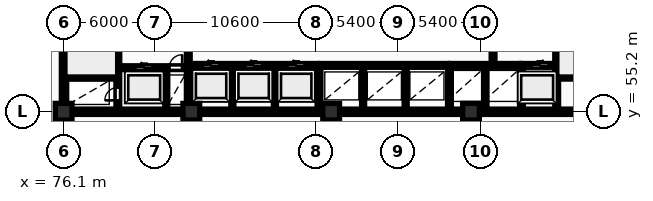
"""IFC4 building model, lengths in metres.
Left out: names, types, materials, properties, quantities, classifications, styles, units other than length and angle.
Written with IfcOpenShell. Run it as: python <this file> out.ifc"""

import sys

from ifc_helpers import new_model, si_unit, direction, frame, frame_2d, origin, origin_2d, place, context, subcontext, project, spatial, rectangle, extrude, element, fill, save


model = new_model("IFC4")
c1 = context("Model", 3, precision=1e-05, world=origin(), true_north=direction((0.0, 1.0)))
c2 = subcontext(c1, "Body", "Model", "MODEL_VIEW")
j1 = project(units=[si_unit("LENGTHUNIT", "METRE"), si_unit("PLANEANGLEUNIT", "RADIAN")], contexts=[c1])
p1 = place(None, origin())
s1 = spatial("IfcSite", under=j1, at=p1, CompositionType="ELEMENT")
p2 = place(p1, origin())
s2 = spatial("IfcBuilding", under=s1, at=p2, CompositionType="ELEMENT")
p3 = place(p2, frame((0.0, 0.0, 5.4)))
s3 = spatial("IfcBuildingStorey", under=s2, at=p3, CompositionType="ELEMENT", Elevation=5.4)
for number, where, z_axis, x_axis in (
    (1, (76.1, 55.2, 0.0), (0.0, 0.0, 1.0), (1.0, 0.0, 0.0)),
    (2, (84.5, 55.2, 0.0), (0.0, 0.0, 1.0), (1.0, 0.0, 0.0)),
    (3, (93.7, 55.2, 0.0), (0.0, 0.0, 1.0), (1.0, 0.0, 0.0)),
    (4, (102.9, 55.2, 0.0), (0.0, 0.0, 1.0), (1.0, 0.0, 0.0)),
):
    element("IfcColumn", number, at=place(p3, frame(where, z_axis=z_axis, x_axis=x_axis)), inside=s3, PredefinedType="COLUMN", context=c2, shape_type="SweptSolid", body=[
        extrude(rectangle(XDim=1.1, YDim=1.1, at=origin_2d()), origin(), (0.0, 0.0, 1.0), 4.6),
    ])
p4 = place(p3, frame((75.95, 55.2, 0.0), z_axis=(0.0, 0.0, 1.0), x_axis=(1.0, 0.0, 0.0)))
e5 = element("IfcWall", 5, at=p4, inside=s3, PredefinedType="SHEAR", context=c2, shape_type="SweptSolid", body=[
    extrude(rectangle(XDim=36.3, YDim=0.35, at=frame_2d((18.15, 0.0))), origin(), (0.0, 0.0, 1.0), 4.6),
])
p5 = place(p3, frame((76.125, 55.375, 0.0), z_axis=(0.0, 0.0, 1.0), x_axis=(0.0, 1.0, 0.0)))
e6 = element("IfcWall", 6, at=p5, inside=s3, PredefinedType="SHEAR", context=c2, shape_type="SweptSolid", body=[
    extrude(rectangle(XDim=11.65, YDim=0.35, at=frame_2d((5.825, 0.0))), origin(), (0.0, 0.0, 1.0), 4.6),
])
p6 = place(p3, frame((79.665, 55.4, 0.0), z_axis=(0.0, 0.0, 1.0), x_axis=(0.0, 1.0, 0.0)))
e7 = element("IfcWall", 7, at=p6, inside=s3, PredefinedType="SHEAR", context=c2, shape_type="SweptSolid", body=[
    extrude(rectangle(XDim=11.6, YDim=0.25, at=frame_2d((5.8, 0.0))), origin(), (0.0, 0.0, 1.0), 4.6),
])
p7 = place(p6, frame((0.55, 0.0, 0.0)))
e8 = element("IfcOpeningElement", 8, at=p7, cuts=e7, PredefinedType="OPENING", context=c2, shape_type="SweptSolid", body=[
    extrude(rectangle(XDim=0.85, YDim=2.05, at=frame_2d((0.425, 1.025))), frame((0.0, 0.135, 0.0), z_axis=(0.0, -1.0, 0.0), x_axis=(1.0, 0.0, 0.0)), (0.0, 0.0, 1.0), 0.27),
])
p8 = place(p6, frame((8.4, 0.0, 0.0)))
e9 = element("IfcOpeningElement", 9, at=p8, cuts=e7, PredefinedType="OPENING", context=c2, shape_type="SweptSolid", body=[
    extrude(rectangle(XDim=1.1, YDim=2.1, at=frame_2d((0.55, 1.05))), frame((0.0, 0.135, 0.0), z_axis=(0.0, -1.0, 0.0), x_axis=(1.0, 0.0, 0.0)), (0.0, 0.0, 1.0), 0.27),
])
p9 = place(p6, frame((10.25, 0.0, 0.0)))
e10 = element("IfcOpeningElement", 10, at=p9, cuts=e7, PredefinedType="OPENING", context=c2, shape_type="SweptSolid", body=[
    extrude(rectangle(XDim=0.85, YDim=2.05, at=frame_2d((0.425, 1.025))), frame((0.0, 0.135, 0.0), z_axis=(0.0, -1.0, 0.0), x_axis=(1.0, 0.0, 0.0)), (0.0, 0.0, 1.0), 0.27),
])
p10 = place(p3, frame((76.3, 57.475, 0.0), z_axis=(0.0, 0.0, 1.0), x_axis=(1.0, 0.0, 0.0)))
e11 = element("IfcWall", 11, at=p10, inside=s3, PredefinedType="SHEAR", context=c2, shape_type="SweptSolid", body=[
    extrude(rectangle(XDim=3.24, YDim=0.25, at=frame_2d((1.62, 0.0))), origin(), (0.0, 0.0, 1.0), 4.6),
])
p11 = place(p3, frame((79.79, 58.1, 0.0), z_axis=(0.0, 0.0, 1.0), x_axis=(1.0, 0.0, 0.0)))
e12 = element("IfcWall", 12, at=p11, inside=s3, PredefinedType="SHEAR", context=c2, shape_type="SweptSolid", body=[
    extrude(rectangle(XDim=4.39, YDim=0.25, at=frame_2d((2.195, 0.0))), origin(), (0.0, 0.0, 1.0), 4.6),
])
p12 = place(p11, frame((1.05, 0.0, 0.0)))
e13 = element("IfcOpeningElement", 13, at=p12, cuts=e12, PredefinedType="OPENING", context=c2, shape_type="SweptSolid", body=[
    extrude(rectangle(XDim=1.12, YDim=2.12, at=frame_2d((0.56, 1.06))), frame((0.0, 0.135, 0.0), z_axis=(0.0, -1.0, 0.0), x_axis=(1.0, 0.0, 0.0)), (0.0, 0.0, 1.0), 0.27),
])
p13 = place(p11, frame((3.26, 0.0, 0.0)))
e14 = element("IfcOpeningElement", 14, at=p13, cuts=e12, PredefinedType="OPENING", context=c2, shape_type="SweptSolid", body=[
    extrude(rectangle(XDim=0.85, YDim=2.05, at=frame_2d((0.425, 1.025))), frame((0.0, 0.135, 0.0), z_axis=(0.0, -1.0, 0.0), x_axis=(1.0, 0.0, 0.0)), (0.0, 0.0, 1.0), 0.27),
])
p14 = place(p3, frame((82.85, 55.4, 0.0), z_axis=(0.0, 0.0, 1.0), x_axis=(0.0, 1.0, 0.0)))
e15 = element("IfcWall", 15, at=p14, inside=s3, PredefinedType="PARTITIONING", context=c2, shape_type="SweptSolid", body=[
    extrude(rectangle(XDim=2.56, YDim=0.2, at=frame_2d((1.28, 0.0))), origin(), (0.0, 0.0, 1.0), 4.3),
])
p15 = place(p3, frame((84.3, 55.4, 0.0), z_axis=(0.0, 0.0, 1.0), x_axis=(0.0, 1.0, 0.0)))
e16 = element("IfcWall", 16, at=p15, inside=s3, PredefinedType="SHEAR", context=c2, shape_type="SweptSolid", body=[
    extrude(rectangle(XDim=11.6, YDim=0.25, at=frame_2d((5.8, 0.0))), origin(), (0.0, 0.0, 1.0), 4.6),
])
p16 = place(p15, frame((5.2, 0.0, 0.0)))
e17 = element("IfcOpeningElement", 17, at=p16, cuts=e16, PredefinedType="OPENING", context=c2, shape_type="SweptSolid", body=[
    extrude(rectangle(XDim=1.1, YDim=2.1, at=frame_2d((0.55, 1.05))), frame((0.0, 0.135, 0.0), z_axis=(0.0, -1.0, 0.0), x_axis=(1.0, 0.0, 0.0)), (0.0, 0.0, 1.0), 0.27),
])
for number, where, z_axis, x_axis in (
    (18, (87.2, 55.4, 0.0), (0.0, 0.0, 1.0), (0.0, 1.0, 0.0)),
    (19, (90.0, 55.4, 0.0), (0.0, 0.0, 1.0), (0.0, 1.0, 0.0)),
):
    element("IfcWall", number, at=place(p3, frame(where, z_axis=z_axis, x_axis=x_axis)), inside=s3, PredefinedType="PARTITIONING", context=c2, shape_type="SweptSolid", body=[
        extrude(rectangle(XDim=2.72, YDim=0.2, at=frame_2d((1.36, 0.0))), origin(), (0.0, 0.0, 1.0), 4.3),
    ])
p17 = place(p3, frame((84.42, 58.25, 0.0), z_axis=(0.0, 0.0, 1.0), x_axis=(1.0, 0.0, 0.0)))
e20 = element("IfcWall", 20, at=p17, inside=s3, PredefinedType="SHEAR", context=c2, shape_type="SweptSolid", body=[
    extrude(rectangle(XDim=8.36, YDim=0.25, at=frame_2d((4.18, 0.0))), origin(), (0.0, 0.0, 1.0), 4.6),
])
p18 = place(p17, frame((0.82, 0.0, 0.0)))
e21 = element("IfcOpeningElement", 21, at=p18, cuts=e20, PredefinedType="OPENING", context=c2, shape_type="SweptSolid", body=[
    extrude(rectangle(XDim=1.12, YDim=2.12, at=frame_2d((0.56, 1.06))), frame((0.0, 0.135, 0.0), z_axis=(0.0, -1.0, 0.0), x_axis=(1.0, 0.0, 0.0)), (0.0, 0.0, 1.0), 0.27),
])
p19 = place(p17, frame((3.62, 0.0, 0.0)))
e22 = element("IfcOpeningElement", 22, at=p19, cuts=e20, PredefinedType="OPENING", context=c2, shape_type="SweptSolid", body=[
    extrude(rectangle(XDim=1.12, YDim=2.12, at=frame_2d((0.56, 1.06))), frame((0.0, 0.135, 0.0), z_axis=(0.0, -1.0, 0.0), x_axis=(1.0, 0.0, 0.0)), (0.0, 0.0, 1.0), 0.27),
])
p20 = place(p17, frame((6.42, 0.0, 0.0)))
e23 = element("IfcOpeningElement", 23, at=p20, cuts=e20, PredefinedType="OPENING", context=c2, shape_type="SweptSolid", body=[
    extrude(rectangle(XDim=1.12, YDim=2.12, at=frame_2d((0.56, 1.06))), frame((0.0, 0.135, 0.0), z_axis=(0.0, -1.0, 0.0), x_axis=(1.0, 0.0, 0.0)), (0.0, 0.0, 1.0), 0.27),
])
p21 = place(p3, frame((92.9, 55.4, 0.0), z_axis=(0.0, 0.0, 1.0), x_axis=(0.0, 1.0, 0.0)))
e24 = element("IfcWall", 24, at=p21, inside=s3, PredefinedType="SHEAR", context=c2, shape_type="SweptSolid", body=[
    extrude(rectangle(XDim=2.85, YDim=0.25, at=frame_2d((1.425, 0.0))), origin(), (0.0, 0.0, 1.0), 4.6),
])
for number, where, z_axis, x_axis in (
    (25, (95.8, 55.4, 0.0), (0.0, 0.0, 1.0), (0.0, 1.0, 0.0)),
    (26, (98.6, 55.4, 0.0), (0.0, 0.0, 1.0), (0.0, 1.0, 0.0)),
):
    element("IfcWall", number, at=place(p3, frame(where, z_axis=z_axis, x_axis=x_axis)), inside=s3, PredefinedType="PARTITIONING", context=c2, shape_type="SweptSolid", body=[
        extrude(rectangle(XDim=2.72, YDim=0.2, at=frame_2d((1.36, 0.0))), origin(), (0.0, 0.0, 1.0), 4.3),
    ])
p22 = place(p3, frame((93.02, 58.25, 0.0), z_axis=(0.0, 0.0, 1.0), x_axis=(1.0, 0.0, 0.0)))
e27 = element("IfcWall", 27, at=p22, inside=s3, PredefinedType="SHEAR", context=c2, shape_type="SweptSolid", body=[
    extrude(rectangle(XDim=8.36, YDim=0.25, at=frame_2d((4.18, 0.0))), origin(), (0.0, 0.0, 1.0), 4.6),
])
p23 = place(p3, frame((101.48, 55.4, 0.0), z_axis=(0.0, 0.0, 1.0), x_axis=(0.0, 1.0, 0.0)))
e28 = element("IfcWall", 28, at=p23, inside=s3, PredefinedType="SHEAR", context=c2, shape_type="SweptSolid", body=[
    extrude(rectangle(XDim=2.85, YDim=0.25, at=frame_2d((1.425, 0.0))), origin(), (0.0, 0.0, 1.0), 4.6),
])
p24 = place(p3, frame((103.85, 55.4, 0.0), z_axis=(0.0, 0.0, 1.0), x_axis=(0.0, 1.0, 0.0)))
e29 = element("IfcWall", 29, at=p24, inside=s3, PredefinedType="PARTITIONING", context=c2, shape_type="SweptSolid", body=[
    extrude(rectangle(XDim=2.72, YDim=0.2, at=frame_2d((1.36, 0.0))), origin(), (0.0, 0.0, 1.0), 4.3),
])
p25 = place(p3, frame((101.55, 58.25, 0.0), z_axis=(0.0, 0.0, 1.0), x_axis=(1.0, 0.0, 0.0)))
e30 = element("IfcWall", 30, at=p25, inside=s3, PredefinedType="SHEAR", context=c2, shape_type="SweptSolid", body=[
    extrude(rectangle(XDim=4.6, YDim=0.25, at=frame_2d((2.3, 0.0))), origin(), (0.0, 0.0, 1.0), 4.6),
])
p26 = place(p3, frame((106.22, 55.4, 0.0), z_axis=(0.0, 0.0, 1.0), x_axis=(0.0, 1.0, 0.0)))
e31 = element("IfcWall", 31, at=p26, inside=s3, PredefinedType="SHEAR", context=c2, shape_type="SweptSolid", body=[
    extrude(rectangle(XDim=2.85, YDim=0.25, at=frame_2d((1.425, 0.0))), origin(), (0.0, 0.0, 1.0), 4.6),
])
p27 = place(p3, frame((106.22, 58.25, 0.0), z_axis=(0.0, 0.0, 1.0), x_axis=(1.0, 0.0, 0.0)))
e32 = element("IfcWall", 32, at=p27, inside=s3, PredefinedType="SHEAR", context=c2, shape_type="SweptSolid", body=[
    extrude(rectangle(XDim=2.46, YDim=0.25, at=frame_2d((1.23, 0.0))), origin(), (0.0, 0.0, 1.0), 4.6),
])
p28 = place(p27, frame((0.67, 0.0, 0.0)))
e33 = element("IfcOpeningElement", 33, at=p28, cuts=e32, PredefinedType="OPENING", context=c2, shape_type="SweptSolid", body=[
    extrude(rectangle(XDim=1.12, YDim=2.12, at=frame_2d((0.56, 1.06))), frame((0.0, 0.135, 0.0), z_axis=(0.0, -1.0, 0.0), x_axis=(1.0, 0.0, 0.0)), (0.0, 0.0, 1.0), 0.27),
])
p29 = place(p3, frame((104.35, 58.4, 0.0), z_axis=(0.0, 0.0, 1.0), x_axis=(0.0, 1.0, 0.0)))
e34 = element("IfcWall", 34, at=p29, inside=s3, PredefinedType="SHEAR", context=c2, shape_type="SweptSolid", body=[
    extrude(rectangle(XDim=8.6, YDim=0.25, at=frame_2d((4.3, 0.0))), origin(), (0.0, 0.0, 1.0), 4.6),
])
p30 = place(p29, frame((1.8, 0.0, 0.0)))
e35 = element("IfcOpeningElement", 35, at=p30, cuts=e34, PredefinedType="OPENING", context=c2, shape_type="SweptSolid", body=[
    extrude(rectangle(XDim=1.1, YDim=2.1, at=frame_2d((0.55, 1.05))), frame((0.0, 0.135, 0.0), z_axis=(0.0, -1.0, 0.0), x_axis=(1.0, 0.0, 0.0)), (0.0, 0.0, 1.0), 0.27),
])
p31 = place(p3, frame((108.535, 55.4, 0.0), z_axis=(0.0, 0.0, 1.0), x_axis=(0.0, 1.0, 0.0)))
e36 = element("IfcWall", 36, at=p31, inside=s3, PredefinedType="SHEAR", context=c2, shape_type="SweptSolid", body=[
    extrude(rectangle(XDim=11.6, YDim=0.25, at=frame_2d((5.8, 0.0))), origin(), (0.0, 0.0, 1.0), 4.6),
])
p32 = place(p31, frame((8.2, 0.0, 0.0)))
e37 = element("IfcOpeningElement", 37, at=p32, cuts=e36, PredefinedType="OPENING", context=c2, shape_type="SweptSolid", body=[
    extrude(rectangle(XDim=1.1, YDim=2.1, at=frame_2d((0.55, 1.05))), frame((0.0, 0.135, 0.0), z_axis=(0.0, -1.0, 0.0), x_axis=(1.0, 0.0, 0.0)), (0.0, 0.0, 1.0), 0.27),
])
p33 = place(p31, frame((10.25, 0.0, 0.0)))
e38 = element("IfcOpeningElement", 38, at=p33, cuts=e36, PredefinedType="OPENING", context=c2, shape_type="SweptSolid", body=[
    extrude(rectangle(XDim=0.85, YDim=2.05, at=frame_2d((0.425, 1.025))), frame((0.0, 0.135, 0.0), z_axis=(0.0, -1.0, 0.0), x_axis=(1.0, 0.0, 0.0)), (0.0, 0.0, 1.0), 0.27),
])
p34 = place(p3, frame((108.66, 57.475, 0.0), z_axis=(0.0, 0.0, 1.0), x_axis=(1.0, 0.0, 0.0)))
e39 = element("IfcWall", 39, at=p34, inside=s3, PredefinedType="SHEAR", context=c2, shape_type="SweptSolid", body=[
    extrude(rectangle(XDim=3.24, YDim=0.25, at=frame_2d((1.62, 0.0))), origin(), (0.0, 0.0, 1.0), 4.6),
])
p35 = place(p7, origin())
e40 = element("IfcDoor", 40, at=p35, inside=s3, OperationType="SINGLE_SWING_LEFT", PredefinedType="DOOR", context=c2, shape_type="SweptSolid", body=[
    extrude(rectangle(XDim=0.85, YDim=2.05, at=frame_2d((0.425, 1.025))), frame((0.0, 0.025, 0.0), z_axis=(0.0, -1.0, 0.0), x_axis=(1.0, 0.0, 0.0)), (0.0, 0.0, 1.0), 0.05),
])
fill(e8, e40)
p36 = place(p12, origin())
e41 = element("IfcDoor", 41, at=p36, inside=s3, OperationType="SLIDING_TO_LEFT", PredefinedType="DOOR", context=c2, shape_type="SweptSolid", body=[
    extrude(rectangle(XDim=1.12, YDim=2.12, at=frame_2d((0.56, 1.06))), frame((0.0, 0.025, 0.0), z_axis=(0.0, -1.0, 0.0), x_axis=(1.0, 0.0, 0.0)), (0.0, 0.0, 1.0), 0.05),
])
fill(e13, e41)
p37 = place(p13, origin())
e42 = element("IfcDoor", 42, at=p37, inside=s3, OperationType="SINGLE_SWING_RIGHT", PredefinedType="DOOR", context=c2, shape_type="SweptSolid", body=[
    extrude(rectangle(XDim=0.85, YDim=2.05, at=frame_2d((0.425, 1.025))), frame((0.0, 0.025, 0.0), z_axis=(0.0, -1.0, 0.0), x_axis=(1.0, 0.0, 0.0)), (0.0, 0.0, 1.0), 0.05),
])
fill(e14, e42)
p38 = place(p18, origin())
e43 = element("IfcDoor", 43, at=p38, inside=s3, OperationType="SLIDING_TO_LEFT", PredefinedType="DOOR", context=c2, shape_type="SweptSolid", body=[
    extrude(rectangle(XDim=1.12, YDim=2.12, at=frame_2d((0.56, 1.06))), frame((0.0, 0.025, 0.0), z_axis=(0.0, -1.0, 0.0), x_axis=(1.0, 0.0, 0.0)), (0.0, 0.0, 1.0), 0.05),
])
fill(e21, e43)
p39 = place(p19, origin())
e44 = element("IfcDoor", 44, at=p39, inside=s3, OperationType="SLIDING_TO_LEFT", PredefinedType="DOOR", context=c2, shape_type="SweptSolid", body=[
    extrude(rectangle(XDim=1.12, YDim=2.12, at=frame_2d((0.56, 1.06))), frame((0.0, 0.025, 0.0), z_axis=(0.0, -1.0, 0.0), x_axis=(1.0, 0.0, 0.0)), (0.0, 0.0, 1.0), 0.05),
])
fill(e22, e44)
p40 = place(p20, origin())
e45 = element("IfcDoor", 45, at=p40, inside=s3, OperationType="SLIDING_TO_LEFT", PredefinedType="DOOR", context=c2, shape_type="SweptSolid", body=[
    extrude(rectangle(XDim=1.12, YDim=2.12, at=frame_2d((0.56, 1.06))), frame((0.0, 0.025, 0.0), z_axis=(0.0, -1.0, 0.0), x_axis=(1.0, 0.0, 0.0)), (0.0, 0.0, 1.0), 0.05),
])
fill(e23, e45)
p41 = place(p28, origin())
e46 = element("IfcDoor", 46, at=p41, inside=s3, OperationType="SLIDING_TO_RIGHT", PredefinedType="DOOR", context=c2, shape_type="SweptSolid", body=[
    extrude(rectangle(XDim=1.12, YDim=2.12, at=frame_2d((0.56, 1.06))), frame((0.0, 0.025, 0.0), z_axis=(0.0, -1.0, 0.0), x_axis=(1.0, 0.0, 0.0)), (0.0, 0.0, 1.0), 0.05),
])
fill(e33, e46)
save(model, sys.argv[1])
